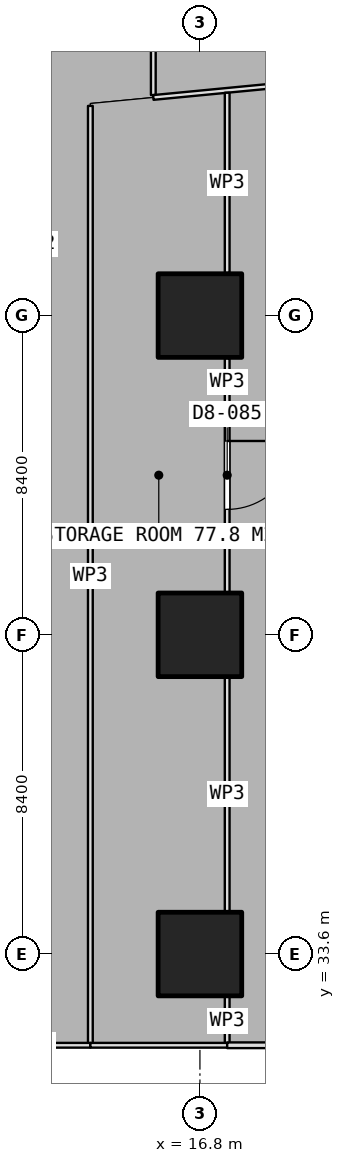
"""IFC4 building model, lengths in metres.
Left out: names, types, materials, properties, quantities, classifications, styles, units other than length and angle.
Written with IfcOpenShell. Run it as: python <this file> out.ifc"""

import sys

from ifc_helpers import new_model, si_unit, direction, frame, frame_2d, origin, origin_2d, place, context, subcontext, project, spatial, rectangle, extrude, element, fill, save


model = new_model("IFC4")
c1 = context("Model", 3, precision=1e-05, world=origin(), true_north=direction((0.0, 1.0)))
c2 = subcontext(c1, "Body", "Model", "MODEL_VIEW")
j1 = project(units=[si_unit("LENGTHUNIT", "METRE"), si_unit("PLANEANGLEUNIT", "RADIAN")], contexts=[c1])
p1 = place(None, origin())
s1 = spatial("IfcSite", under=j1, at=p1, CompositionType="ELEMENT")
p2 = place(p1, origin())
s2 = spatial("IfcBuilding", under=s1, at=p2, CompositionType="ELEMENT")
p3 = place(p2, frame((0.0, 0.0, 62.9)))
s3 = spatial("IfcBuildingStorey", under=s2, at=p3, CompositionType="ELEMENT", Elevation=62.9)
for number, where, z_axis, x_axis in (
    (1, (16.8, 33.6, 0.0), (0.0, 0.0, 1.0), (1.0, 0.0, 0.0)),
    (2, (16.8, 42.0, 0.0), (0.0, 0.0, 1.0), (1.0, 0.0, 0.0)),
    (3, (16.8, 50.4, 0.0), (0.0, 0.0, 1.0), (1.0, 0.0, 0.0)),
):
    element("IfcColumn", number, at=place(p3, frame(where, z_axis=z_axis, x_axis=x_axis)), inside=s3, PredefinedType="COLUMN", context=c2, shape_type="SweptSolid", body=[
        extrude(rectangle(XDim=2.2, YDim=2.2, at=origin_2d()), origin(), (0.0, 0.0, 1.0), 3.75),
    ])
p4 = place(p3, frame((15.573, 56.202, 0.0), z_axis=(0.0, 0.0, 1.0), x_axis=(0.0, 1.0, 0.0)))
e4 = element("IfcWall", 4, at=p4, inside=s3, PredefinedType="PARTITIONING", context=c2, shape_type="SweptSolid", body=[
    extrude(rectangle(XDim=4.98, YDim=0.125, at=frame_2d((2.49, 0.0))), origin(), (0.0, 0.0, 1.0), 3.5),
])
p5 = place(p3, frame((25.466, 57.09, 0.0), z_axis=(0.0, 0.0, 1.0), x_axis=(-0.995409839186, -0.09570398138, 0.0)))
e5 = element("IfcWall", 5, at=p5, inside=s3, PredefinedType="PARTITIONING", context=c2, shape_type="SweptSolid", body=[
    extrude(rectangle(XDim=9.939, YDim=0.125, at=frame_2d((4.969, 0.0))), origin(), (0.0, 0.0, 1.0), 3.5),
])
p6 = place(p5, frame((4.469, 0.0, 0.0)))
e6 = element("IfcOpeningElement", 6, at=p6, cuts=e5, PredefinedType="OPENING", context=c2, shape_type="SweptSolid", body=[
    extrude(rectangle(XDim=1.0, YDim=2.1, at=frame_2d((0.5, 1.05))), frame((0.0, 0.073, 0.0), z_axis=(0.0, -1.0, 0.0), x_axis=(1.0, 0.0, 0.0)), (0.0, 0.0, 1.0), 0.145),
])
p7 = place(p3, frame((13.917, 55.917, 0.0), z_axis=(0.0, 0.0, 1.0), x_axis=(0.0, -1.0, 0.0)))
e7 = element("IfcWall", 7, at=p7, inside=s3, PredefinedType="PARTITIONING", context=c2, shape_type="SweptSolid", body=[
    extrude(rectangle(XDim=24.717, YDim=0.125, at=frame_2d((12.358, 0.0))), origin(), (0.0, 0.0, 1.0), 3.5),
])
p8 = place(p3, frame((13.917, 31.2, 0.0), z_axis=(0.0, 0.0, 1.0), x_axis=(-1.0, 0.0, 0.0)))
e8 = element("IfcWall", 8, at=p8, inside=s3, PredefinedType="PARTITIONING", context=c2, shape_type="SweptSolid", body=[
    extrude(rectangle(XDim=7.282, YDim=0.125, at=frame_2d((3.641, 0.0))), origin(), (0.0, 0.0, 1.0), 3.5),
])
p9 = place(p8, frame((2.726, 0.0, 0.0)))
e9 = element("IfcOpeningElement", 9, at=p9, cuts=e8, PredefinedType="OPENING", context=c2, shape_type="SweptSolid", body=[
    extrude(rectangle(XDim=1.8, YDim=2.1, at=frame_2d((0.9, 1.05))), frame((0.0, 0.073, 0.0), z_axis=(0.0, -1.0, 0.0), x_axis=(1.0, 0.0, 0.0)), (0.0, 0.0, 1.0), 0.145),
])
p10 = place(p3, frame((17.517, 56.263, 0.0), z_axis=(0.0, 0.0, 1.0), x_axis=(0.0, -1.0, 0.0)))
e10 = element("IfcWall", 10, at=p10, inside=s3, PredefinedType="PARTITIONING", context=c2, shape_type="SweptSolid", body=[
    extrude(rectangle(XDim=4.743, YDim=0.125, at=frame_2d((2.372, 0.0))), origin(), (0.0, 0.0, 1.0), 3.5),
])
p11 = place(p3, frame((17.517, 49.28, 0.0), z_axis=(0.0, 0.0, 1.0), x_axis=(0.0, -1.0, 0.0)))
e11 = element("IfcWall", 11, at=p11, inside=s3, PredefinedType="PARTITIONING", context=c2, shape_type="SweptSolid", body=[
    extrude(rectangle(XDim=6.16, YDim=0.125, at=frame_2d((3.08, 0.0))), origin(), (0.0, 0.0, 1.0), 3.5),
])
p12 = place(p11, frame((2.18, 0.0, 0.0)))
e12 = element("IfcOpeningElement", 12, at=p12, cuts=e11, PredefinedType="OPENING", context=c2, shape_type="SweptSolid", body=[
    extrude(rectangle(XDim=1.8, YDim=2.1, at=frame_2d((0.9, 1.05))), frame((0.0, 0.073, 0.0), z_axis=(0.0, -1.0, 0.0), x_axis=(1.0, 0.0, 0.0)), (0.0, 0.0, 1.0), 0.145),
])
p13 = place(p3, frame((17.517, 40.88, 0.0), z_axis=(0.0, 0.0, 1.0), x_axis=(0.0, -1.0, 0.0)))
e13 = element("IfcWall", 13, at=p13, inside=s3, PredefinedType="PARTITIONING", context=c2, shape_type="SweptSolid", body=[
    extrude(rectangle(XDim=6.16, YDim=0.125, at=frame_2d((3.08, 0.0))), origin(), (0.0, 0.0, 1.0), 3.5),
])
p14 = place(p3, frame((17.517, 32.48, 0.0), z_axis=(0.0, 0.0, 1.0), x_axis=(0.0, -1.0, 0.0)))
e14 = element("IfcWall", 14, at=p14, inside=s3, PredefinedType="PARTITIONING", context=c2, shape_type="SweptSolid", body=[
    extrude(rectangle(XDim=1.28, YDim=0.125, at=frame_2d((0.64, 0.0))), origin(), (0.0, 0.0, 1.0), 3.5),
])
p15 = place(p3, frame((17.517, 31.2, 0.0), z_axis=(0.0, 0.0, 1.0), x_axis=(-1.0, 0.0, 0.0)))
e15 = element("IfcWall", 15, at=p15, inside=s3, PredefinedType="PARTITIONING", context=c2, shape_type="SweptSolid", body=[
    extrude(rectangle(XDim=3.6, YDim=0.125, at=frame_2d((1.8, 0.0))), origin(), (0.0, 0.0, 1.0), 3.5),
])
p16 = place(p3, frame((22.4, 31.2, 0.0), z_axis=(0.0, 0.0, 1.0), x_axis=(-1.0, 0.0, 0.0)))
e16 = element("IfcWall", 16, at=p16, inside=s3, PredefinedType="PARTITIONING", context=c2, shape_type="SweptSolid", body=[
    extrude(rectangle(XDim=4.883, YDim=0.15, at=frame_2d((2.441, 0.0))), origin(), (0.0, 0.0, 1.0), 3.5),
])
p17 = place(p12, origin())
e17 = element("IfcDoor", 17, at=p17, inside=s3, OperationType="DOUBLE_DOOR_SINGLE_SWING", PredefinedType="DOOR", context=c2, shape_type="SweptSolid", body=[
    extrude(rectangle(XDim=1.8, YDim=2.1, at=frame_2d((0.9, 1.05))), frame((0.0, 0.025, 0.0), z_axis=(0.0, -1.0, 0.0), x_axis=(1.0, 0.0, 0.0)), (0.0, 0.0, 1.0), 0.05),
])
fill(e12, e17)
save(model, sys.argv[1])
